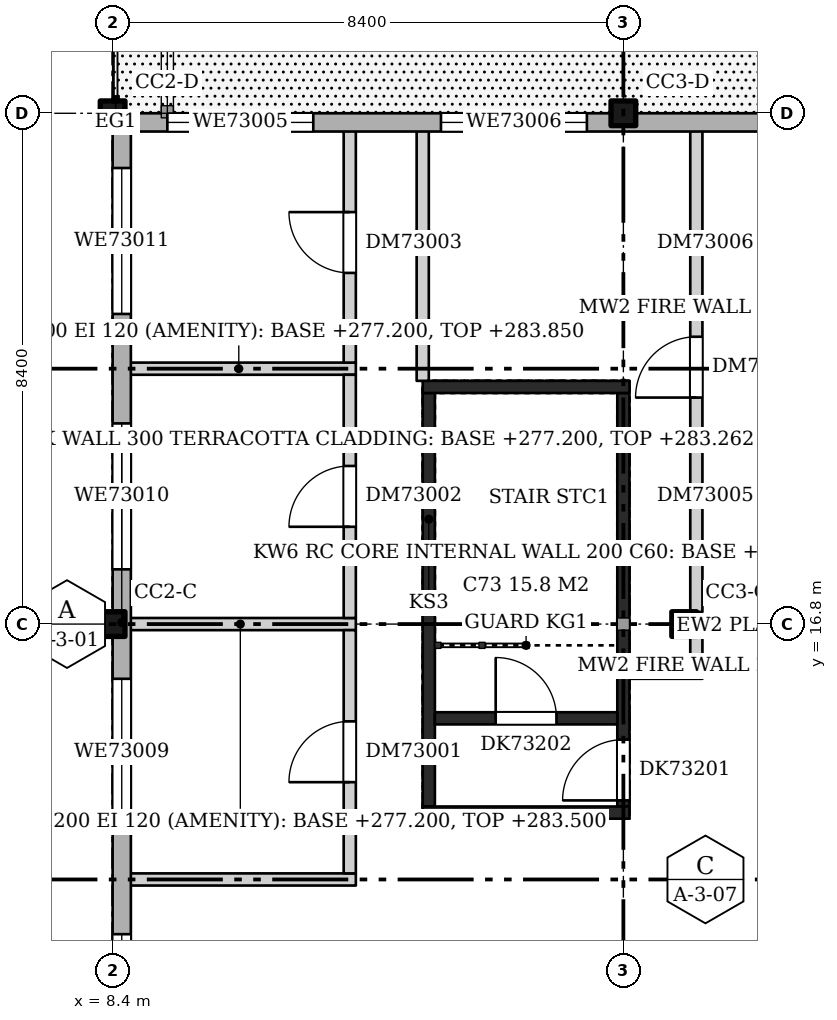
"""IFC4 building model, lengths in metres.
Left out: names, types, materials, properties, quantities, classifications, styles, units other than length and angle.
Written with IfcOpenShell. Run it as: python <this file> out.ifc"""

import sys

from ifc_helpers import new_model, si_unit, direction, frame, frame_2d, origin, origin_2d, place, context, subcontext, project, spatial, rectangle, hollow_circle, extrude, element, fill, save


model = new_model("IFC4")
c1 = context("Model", 3, precision=1e-05, world=origin(), true_north=direction((0.0, 1.0)))
c2 = subcontext(c1, "Body", "Model", "MODEL_VIEW")
j1 = project(units=[si_unit("LENGTHUNIT", "METRE"), si_unit("PLANEANGLEUNIT", "RADIAN")], contexts=[c1])
p1 = place(None, origin())
s1 = spatial("IfcSite", under=j1, at=p1, CompositionType="ELEMENT")
p2 = place(p1, origin())
s2 = spatial("IfcBuilding", under=s1, at=p2, CompositionType="ELEMENT")
p3 = place(p2, frame((0.0, 0.0, 277.2)))
s3 = spatial("IfcBuildingStorey", under=s2, at=p3, CompositionType="ELEMENT", Elevation=277.2)
for number, where, z_axis, x_axis in (
    (1, (8.4, 16.8, 0.0), (0.0, 0.0, 1.0), (1.0, 0.0, 0.0)),
    (2, (8.4, 25.2, 0.0), (0.0, 0.0, 1.0), (1.0, 0.0, 0.0)),
    (3, (17.8, 16.8, 0.0), (0.0, 0.0, 1.0), (1.0, 0.0, 0.0)),
    (4, (16.8, 25.2, 0.0), (0.0, 0.0, 1.0), (1.0, 0.0, 0.0)),
):
    element("IfcColumn", number, at=place(p3, frame(where, z_axis=z_axis, x_axis=x_axis)), inside=s3, PredefinedType="COLUMN", context=c2, shape_type="SweptSolid", body=[
        extrude(hollow_circle(Radius=0.203, WallThickness=0.016, at=origin_2d()), origin(), (0.0, 0.0, 1.0), 6.65),
    ])
p4 = place(p3, frame((13.6, 13.8, 0.0), z_axis=(0.0, 0.0, 1.0), x_axis=(0.0, 1.0, 0.0)))
e5 = element("IfcWall", 5, at=p4, inside=s3, PredefinedType="SHEAR", context=c2, shape_type="SweptSolid", body=[
    extrude(rectangle(XDim=6.8, YDim=0.2, at=frame_2d((3.4, 0.0))), origin(), (0.0, 0.0, 1.0), 6.65),
])
p5 = place(p3, frame((16.8, 13.8, 0.0), z_axis=(0.0, 0.0, 1.0), x_axis=(0.0, 1.0, 0.0)))
e6 = element("IfcWall", 6, at=p5, inside=s3, PredefinedType="SHEAR", context=c2, shape_type="SweptSolid", body=[
    extrude(rectangle(XDim=6.8, YDim=0.2, at=frame_2d((3.4, 0.0))), origin(), (0.0, 0.0, 1.0), 6.65),
])
p6 = place(p5, frame((0.1, 0.0, 0.0)))
e7 = element("IfcOpeningElement", 7, at=p6, cuts=e6, PredefinedType="OPENING", context=c2, shape_type="SweptSolid", body=[
    extrude(rectangle(XDim=1.0, YDim=2.1, at=frame_2d((0.5, 1.05))), frame((0.0, 0.11, 0.0), z_axis=(0.0, -1.0, 0.0), x_axis=(1.0, 0.0, 0.0)), (0.0, 0.0, 1.0), 0.22),
])
for number, where, z_axis, x_axis in (
    (8, (13.5, 13.7, 0.0), (0.0, 0.0, 1.0), (1.0, 0.0, 0.0)),
    (9, (13.5, 20.7, 0.0), (0.0, 0.0, 1.0), (1.0, 0.0, 0.0)),
):
    element("IfcWall", number, at=place(p3, frame(where, z_axis=z_axis, x_axis=x_axis)), inside=s3, PredefinedType="SHEAR", context=c2, shape_type="SweptSolid", body=[
        extrude(rectangle(XDim=3.4, YDim=0.2, at=frame_2d((1.7, 0.0))), origin(), (0.0, 0.0, 1.0), 6.65),
    ])
p7 = place(p3, frame((13.7, 15.25, 0.0), z_axis=(0.0, 0.0, 1.0), x_axis=(1.0, 0.0, 0.0)))
e10 = element("IfcWall", 10, at=p7, inside=s3, PredefinedType="SHEAR", context=c2, shape_type="SweptSolid", body=[
    extrude(rectangle(XDim=3.0, YDim=0.2, at=frame_2d((1.5, 0.0))), origin(), (0.0, 0.0, 1.0), 6.65),
])
p8 = place(p7, frame((1.0, 0.0, 0.0)))
e11 = element("IfcOpeningElement", 11, at=p8, cuts=e10, PredefinedType="OPENING", context=c2, shape_type="SweptSolid", body=[
    extrude(rectangle(XDim=1.0, YDim=2.1, at=frame_2d((0.5, 1.05))), frame((0.0, 0.11, 0.0), z_axis=(0.0, -1.0, 0.0), x_axis=(1.0, 0.0, 0.0)), (0.0, 0.0, 1.0), 0.22),
])
p9 = place(p3, frame((8.55, 12.6, 0.0), z_axis=(0.0, 0.0, 1.0), x_axis=(1.0, 0.0, 0.0)))
e12 = element("IfcWall", 12, at=p9, inside=s3, PredefinedType="PARTITIONING", context=c2, shape_type="SweptSolid", body=[
    extrude(rectangle(XDim=3.85, YDim=0.2, at=frame_2d((1.925, 0.0))), origin(), (0.0, 0.0, 1.0), 6.65),
])
p10 = place(p3, frame((8.6, 16.8, 0.0), z_axis=(0.0, 0.0, 1.0), x_axis=(1.0, 0.0, 0.0)))
e13 = element("IfcWall", 13, at=p10, inside=s3, PredefinedType="PARTITIONING", context=c2, shape_type="SweptSolid", body=[
    extrude(rectangle(XDim=3.8, YDim=0.2, at=frame_2d((1.9, 0.0))), origin(), (0.0, 0.0, 1.0), 6.3),
])
p11 = place(p3, frame((8.55, 21.0, 0.0), z_axis=(0.0, 0.0, 1.0), x_axis=(1.0, 0.0, 0.0)))
e14 = element("IfcWall", 14, at=p11, inside=s3, PredefinedType="PARTITIONING", context=c2, shape_type="SweptSolid", body=[
    extrude(rectangle(XDim=3.85, YDim=0.2, at=frame_2d((1.925, 0.0))), origin(), (0.0, 0.0, 1.0), 6.65),
])
p12 = place(p3, frame((12.3, 12.7, 0.0), z_axis=(0.0, 0.0, 1.0), x_axis=(0.0, 1.0, 0.0)))
e15 = element("IfcWall", 15, at=p12, inside=s3, PredefinedType="PARTITIONING", context=c2, shape_type="SweptSolid", body=[
    extrude(rectangle(XDim=4.0, YDim=0.2, at=frame_2d((2.0, 0.0))), origin(), (0.0, 0.0, 1.0), 6.65),
])
p13 = place(p12, frame((1.5, 0.0, 0.0)))
e16 = element("IfcOpeningElement", 16, at=p13, cuts=e15, PredefinedType="OPENING", context=c2, shape_type="SweptSolid", body=[
    extrude(rectangle(XDim=1.0, YDim=2.1, at=frame_2d((0.5, 1.05))), frame((0.0, 0.11, 0.0), z_axis=(0.0, -1.0, 0.0), x_axis=(1.0, 0.0, 0.0)), (0.0, 0.0, 1.0), 0.22),
])
p14 = place(p3, frame((12.3, 16.9, 0.0), z_axis=(0.0, 0.0, 1.0), x_axis=(0.0, 1.0, 0.0)))
e17 = element("IfcWall", 17, at=p14, inside=s3, PredefinedType="PARTITIONING", context=c2, shape_type="SweptSolid", body=[
    extrude(rectangle(XDim=4.0, YDim=0.2, at=frame_2d((2.0, 0.0))), origin(), (0.0, 0.0, 1.0), 6.65),
])
p15 = place(p14, frame((1.5, 0.0, 0.0)))
e18 = element("IfcOpeningElement", 18, at=p15, cuts=e17, PredefinedType="OPENING", context=c2, shape_type="SweptSolid", body=[
    extrude(rectangle(XDim=1.0, YDim=2.1, at=frame_2d((0.5, 1.05))), frame((0.0, 0.11, 0.0), z_axis=(0.0, -1.0, 0.0), x_axis=(1.0, 0.0, 0.0)), (0.0, 0.0, 1.0), 0.22),
])
p16 = place(p3, frame((12.3, 21.1, 0.0), z_axis=(0.0, 0.0, 1.0), x_axis=(0.0, 1.0, 0.0)))
e19 = element("IfcWall", 19, at=p16, inside=s3, PredefinedType="PARTITIONING", context=c2, shape_type="SweptSolid", body=[
    extrude(rectangle(XDim=3.95, YDim=0.2, at=frame_2d((1.975, 0.0))), origin(), (0.0, 0.0, 1.0), 6.65),
])
p17 = place(p16, frame((1.475, 0.0, 0.0)))
e20 = element("IfcOpeningElement", 20, at=p17, cuts=e19, PredefinedType="OPENING", context=c2, shape_type="SweptSolid", body=[
    extrude(rectangle(XDim=1.0, YDim=2.1, at=frame_2d((0.5, 1.05))), frame((0.0, 0.11, 0.0), z_axis=(0.0, -1.0, 0.0), x_axis=(1.0, 0.0, 0.0)), (0.0, 0.0, 1.0), 0.22),
])
p18 = place(p3, frame((13.5, 20.8, 0.0), z_axis=(0.0, 0.0, 1.0), x_axis=(0.0, 1.0, 0.0)))
e21 = element("IfcWall", 21, at=p18, inside=s3, PredefinedType="PARTITIONING", context=c2, shape_type="SweptSolid", body=[
    extrude(rectangle(XDim=4.25, YDim=0.2, at=frame_2d((2.125, 0.0))), origin(), (0.0, 0.0, 1.0), 6.65),
])
p19 = place(p3, frame((16.9, 16.0, 0.0), z_axis=(0.0, 0.0, 1.0), x_axis=(1.0, 0.0, 0.0)))
e22 = element("IfcWall", 22, at=p19, inside=s3, PredefinedType="PARTITIONING", context=c2, shape_type="SweptSolid", body=[
    extrude(rectangle(XDim=1.2, YDim=0.2, at=frame_2d((0.6, 0.0))), origin(), (0.0, 0.0, 1.0), 6.65),
])
p20 = place(p3, frame((18.0, 16.1, 0.0), z_axis=(0.0, 0.0, 1.0), x_axis=(0.0, 1.0, 0.0)))
e23 = element("IfcWall", 23, at=p20, inside=s3, PredefinedType="PARTITIONING", context=c2, shape_type="SweptSolid", body=[
    extrude(rectangle(XDim=0.5, YDim=0.2, at=frame_2d((0.25, 0.0))), origin(), (0.0, 0.0, 1.0), 6.65),
])
p21 = place(p3, frame((18.0, 17.0, 0.0), z_axis=(0.0, 0.0, 1.0), x_axis=(0.0, 1.0, 0.0)))
e24 = element("IfcWall", 24, at=p21, inside=s3, PredefinedType="PARTITIONING", context=c2, shape_type="SweptSolid", body=[
    extrude(rectangle(XDim=8.05, YDim=0.2, at=frame_2d((4.025, 0.0))), origin(), (0.0, 0.0, 1.0), 6.65),
])
p22 = place(p21, frame((3.525, 0.0, 0.0)))
e25 = element("IfcOpeningElement", 25, at=p22, cuts=e24, PredefinedType="OPENING", context=c2, shape_type="SweptSolid", body=[
    extrude(rectangle(XDim=1.0, YDim=2.1, at=frame_2d((0.5, 1.05))), frame((0.0, 0.11, 0.0), z_axis=(0.0, -1.0, 0.0), x_axis=(1.0, 0.0, 0.0)), (0.0, 0.0, 1.0), 0.22),
])
p23 = place(p3, frame((25.2, 25.05, 0.0), z_axis=(0.0, 0.0, 1.0), x_axis=(-1.0, 0.0, 0.0)))
e26 = element("IfcWall", 26, at=p23, inside=s3, PredefinedType="SOLIDWALL", context=c2, shape_type="SweptSolid", body=[
    extrude(rectangle(XDim=16.8, YDim=0.3, at=frame_2d((8.4, 0.0))), origin(), (0.0, 0.0, 1.0), 6.3),
])
p24 = place(p23, frame((13.5, 0.0, 0.6)))
e27 = element("IfcOpeningElement", 27, at=p24, cuts=e26, PredefinedType="OPENING", context=c2, shape_type="SweptSolid", body=[
    extrude(rectangle(XDim=2.4, YDim=2.4, at=frame_2d((1.2, 1.2))), frame((0.0, 0.16, 0.0), z_axis=(0.0, -1.0, 0.0), x_axis=(1.0, 0.0, 0.0)), (0.0, 0.0, 1.0), 0.32),
])
p25 = place(p23, frame((9.0, 0.0, 0.6)))
e28 = element("IfcOpeningElement", 28, at=p25, cuts=e26, PredefinedType="OPENING", context=c2, shape_type="SweptSolid", body=[
    extrude(rectangle(XDim=2.4, YDim=2.4, at=frame_2d((1.2, 1.2))), frame((0.0, 0.16, 0.0), z_axis=(0.0, -1.0, 0.0), x_axis=(1.0, 0.0, 0.0)), (0.0, 0.0, 1.0), 0.32),
])
p26 = place(p23, frame((0.9, 0.0, 0.6)))
e29 = element("IfcOpeningElement", 29, at=p26, cuts=e26, PredefinedType="OPENING", context=c2, shape_type="SweptSolid", body=[
    extrude(rectangle(XDim=2.4, YDim=2.4, at=frame_2d((1.2, 1.2))), frame((0.0, 0.16, 0.0), z_axis=(0.0, -1.0, 0.0), x_axis=(1.0, 0.0, 0.0)), (0.0, 0.0, 1.0), 0.32),
])
p27 = place(p3, frame((8.55, 24.9, 0.0), z_axis=(0.0, 0.0, 1.0), x_axis=(0.0, -1.0, 0.0)))
e30 = element("IfcWall", 30, at=p27, inside=s3, PredefinedType="SOLIDWALL", context=c2, shape_type="SweptSolid", body=[
    extrude(rectangle(XDim=16.2, YDim=0.3, at=frame_2d((8.1, 0.0))), origin(), (0.0, 0.0, 1.0), 6.062),
])
p28 = place(p27, frame((13.2, 0.0, 0.6)))
e31 = element("IfcOpeningElement", 31, at=p28, cuts=e30, PredefinedType="OPENING", context=c2, shape_type="SweptSolid", body=[
    extrude(rectangle(XDim=2.4, YDim=2.4, at=frame_2d((1.2, 1.2))), frame((0.0, 0.16, 0.0), z_axis=(0.0, -1.0, 0.0), x_axis=(1.0, 0.0, 0.0)), (0.0, 0.0, 1.0), 0.32),
])
p29 = place(p27, frame((9.0, 0.0, 0.6)))
e32 = element("IfcOpeningElement", 32, at=p29, cuts=e30, PredefinedType="OPENING", context=c2, shape_type="SweptSolid", body=[
    extrude(rectangle(XDim=2.4, YDim=2.4, at=frame_2d((1.2, 1.2))), frame((0.0, 0.16, 0.0), z_axis=(0.0, -1.0, 0.0), x_axis=(1.0, 0.0, 0.0)), (0.0, 0.0, 1.0), 0.32),
])
p30 = place(p27, frame((4.8, 0.0, 0.6)))
e33 = element("IfcOpeningElement", 33, at=p30, cuts=e30, PredefinedType="OPENING", context=c2, shape_type="SweptSolid", body=[
    extrude(rectangle(XDim=2.4, YDim=2.4, at=frame_2d((1.2, 1.2))), frame((0.0, 0.16, 0.0), z_axis=(0.0, -1.0, 0.0), x_axis=(1.0, 0.0, 0.0)), (0.0, 0.0, 1.0), 0.32),
])
p31 = place(p27, frame((0.6, 0.0, 0.6)))
e34 = element("IfcOpeningElement", 34, at=p31, cuts=e30, PredefinedType="OPENING", context=c2, shape_type="SweptSolid", body=[
    extrude(rectangle(XDim=2.4, YDim=2.4, at=frame_2d((1.2, 1.2))), frame((0.0, 0.16, 0.0), z_axis=(0.0, -1.0, 0.0), x_axis=(1.0, 0.0, 0.0)), (0.0, 0.0, 1.0), 0.32),
])
p32 = place(p6, origin())
e35 = element("IfcDoor", 35, at=p32, inside=s3, OperationType="SINGLE_SWING_LEFT", PredefinedType="DOOR", context=c2, shape_type="SweptSolid", body=[
    extrude(rectangle(XDim=1.0, YDim=2.1, at=frame_2d((0.5, 1.05))), frame((0.0, 0.025, 0.0), z_axis=(0.0, -1.0, 0.0), x_axis=(1.0, 0.0, 0.0)), (0.0, 0.0, 1.0), 0.05),
])
fill(e7, e35)
p33 = place(p8, origin())
e36 = element("IfcDoor", 36, at=p33, inside=s3, OperationType="SINGLE_SWING_LEFT", PredefinedType="DOOR", context=c2, shape_type="SweptSolid", body=[
    extrude(rectangle(XDim=1.0, YDim=2.1, at=frame_2d((0.5, 1.05))), frame((0.0, 0.025, 0.0), z_axis=(0.0, -1.0, 0.0), x_axis=(1.0, 0.0, 0.0)), (0.0, 0.0, 1.0), 0.05),
])
fill(e11, e36)
p34 = place(p13, origin())
e37 = element("IfcDoor", 37, at=p34, inside=s3, OperationType="SINGLE_SWING_LEFT", PredefinedType="DOOR", context=c2, shape_type="SweptSolid", body=[
    extrude(rectangle(XDim=1.0, YDim=2.1, at=frame_2d((0.5, 1.05))), frame((0.0, 0.025, 0.0), z_axis=(0.0, -1.0, 0.0), x_axis=(1.0, 0.0, 0.0)), (0.0, 0.0, 1.0), 0.05),
])
fill(e16, e37)
p35 = place(p15, origin())
e38 = element("IfcDoor", 38, at=p35, inside=s3, OperationType="SINGLE_SWING_LEFT", PredefinedType="DOOR", context=c2, shape_type="SweptSolid", body=[
    extrude(rectangle(XDim=1.0, YDim=2.1, at=frame_2d((0.5, 1.05))), frame((0.0, 0.025, 0.0), z_axis=(0.0, -1.0, 0.0), x_axis=(1.0, 0.0, 0.0)), (0.0, 0.0, 1.0), 0.05),
])
fill(e18, e38)
p36 = place(p17, origin())
e39 = element("IfcDoor", 39, at=p36, inside=s3, OperationType="SINGLE_SWING_RIGHT", PredefinedType="DOOR", context=c2, shape_type="SweptSolid", body=[
    extrude(rectangle(XDim=1.0, YDim=2.1, at=frame_2d((0.5, 1.05))), frame((0.0, 0.025, 0.0), z_axis=(0.0, -1.0, 0.0), x_axis=(1.0, 0.0, 0.0)), (0.0, 0.0, 1.0), 0.05),
])
fill(e20, e39)
p37 = place(p22, origin())
e40 = element("IfcDoor", 40, at=p37, inside=s3, OperationType="SINGLE_SWING_LEFT", PredefinedType="DOOR", context=c2, shape_type="SweptSolid", body=[
    extrude(rectangle(XDim=1.0, YDim=2.1, at=frame_2d((0.5, 1.05))), frame((0.0, 0.025, 0.0), z_axis=(0.0, -1.0, 0.0), x_axis=(1.0, 0.0, 0.0)), (0.0, 0.0, 1.0), 0.05),
])
fill(e25, e40)
p38 = place(p24, origin())
e41 = element("IfcWindow", 41, at=p38, inside=s3, PartitioningType="SINGLE_PANEL", PredefinedType="WINDOW", context=c2, shape_type="SweptSolid", body=[
    extrude(rectangle(XDim=2.4, YDim=2.4, at=frame_2d((1.2, 1.2))), frame((0.0, 0.03, 0.0), z_axis=(0.0, -1.0, 0.0), x_axis=(1.0, 0.0, 0.0)), (0.0, 0.0, 1.0), 0.06),
])
fill(e27, e41)
p39 = place(p25, origin())
e42 = element("IfcWindow", 42, at=p39, inside=s3, PartitioningType="SINGLE_PANEL", PredefinedType="WINDOW", context=c2, shape_type="SweptSolid", body=[
    extrude(rectangle(XDim=2.4, YDim=2.4, at=frame_2d((1.2, 1.2))), frame((0.0, 0.03, 0.0), z_axis=(0.0, -1.0, 0.0), x_axis=(1.0, 0.0, 0.0)), (0.0, 0.0, 1.0), 0.06),
])
fill(e28, e42)
p40 = place(p28, origin())
e43 = element("IfcWindow", 43, at=p40, inside=s3, PartitioningType="SINGLE_PANEL", PredefinedType="WINDOW", context=c2, shape_type="SweptSolid", body=[
    extrude(rectangle(XDim=2.4, YDim=2.4, at=frame_2d((1.2, 1.2))), frame((0.0, 0.03, 0.0), z_axis=(0.0, -1.0, 0.0), x_axis=(1.0, 0.0, 0.0)), (0.0, 0.0, 1.0), 0.06),
])
fill(e31, e43)
p41 = place(p29, origin())
e44 = element("IfcWindow", 44, at=p41, inside=s3, PartitioningType="SINGLE_PANEL", PredefinedType="WINDOW", context=c2, shape_type="SweptSolid", body=[
    extrude(rectangle(XDim=2.4, YDim=2.4, at=frame_2d((1.2, 1.2))), frame((0.0, 0.03, 0.0), z_axis=(0.0, -1.0, 0.0), x_axis=(1.0, 0.0, 0.0)), (0.0, 0.0, 1.0), 0.06),
])
fill(e32, e44)
p42 = place(p30, origin())
e45 = element("IfcWindow", 45, at=p42, inside=s3, PartitioningType="SINGLE_PANEL", PredefinedType="WINDOW", context=c2, shape_type="SweptSolid", body=[
    extrude(rectangle(XDim=2.4, YDim=2.4, at=frame_2d((1.2, 1.2))), frame((0.0, 0.03, 0.0), z_axis=(0.0, -1.0, 0.0), x_axis=(1.0, 0.0, 0.0)), (0.0, 0.0, 1.0), 0.06),
])
fill(e33, e45)
p43 = place(p31, origin())
e46 = element("IfcWindow", 46, at=p43, inside=s3, PartitioningType="SINGLE_PANEL", PredefinedType="WINDOW", context=c2, shape_type="SweptSolid", body=[
    extrude(rectangle(XDim=2.4, YDim=2.4, at=frame_2d((1.2, 1.2))), frame((0.0, 0.03, 0.0), z_axis=(0.0, -1.0, 0.0), x_axis=(1.0, 0.0, 0.0)), (0.0, 0.0, 1.0), 0.06),
])
fill(e34, e46)
save(model, sys.argv[1])
